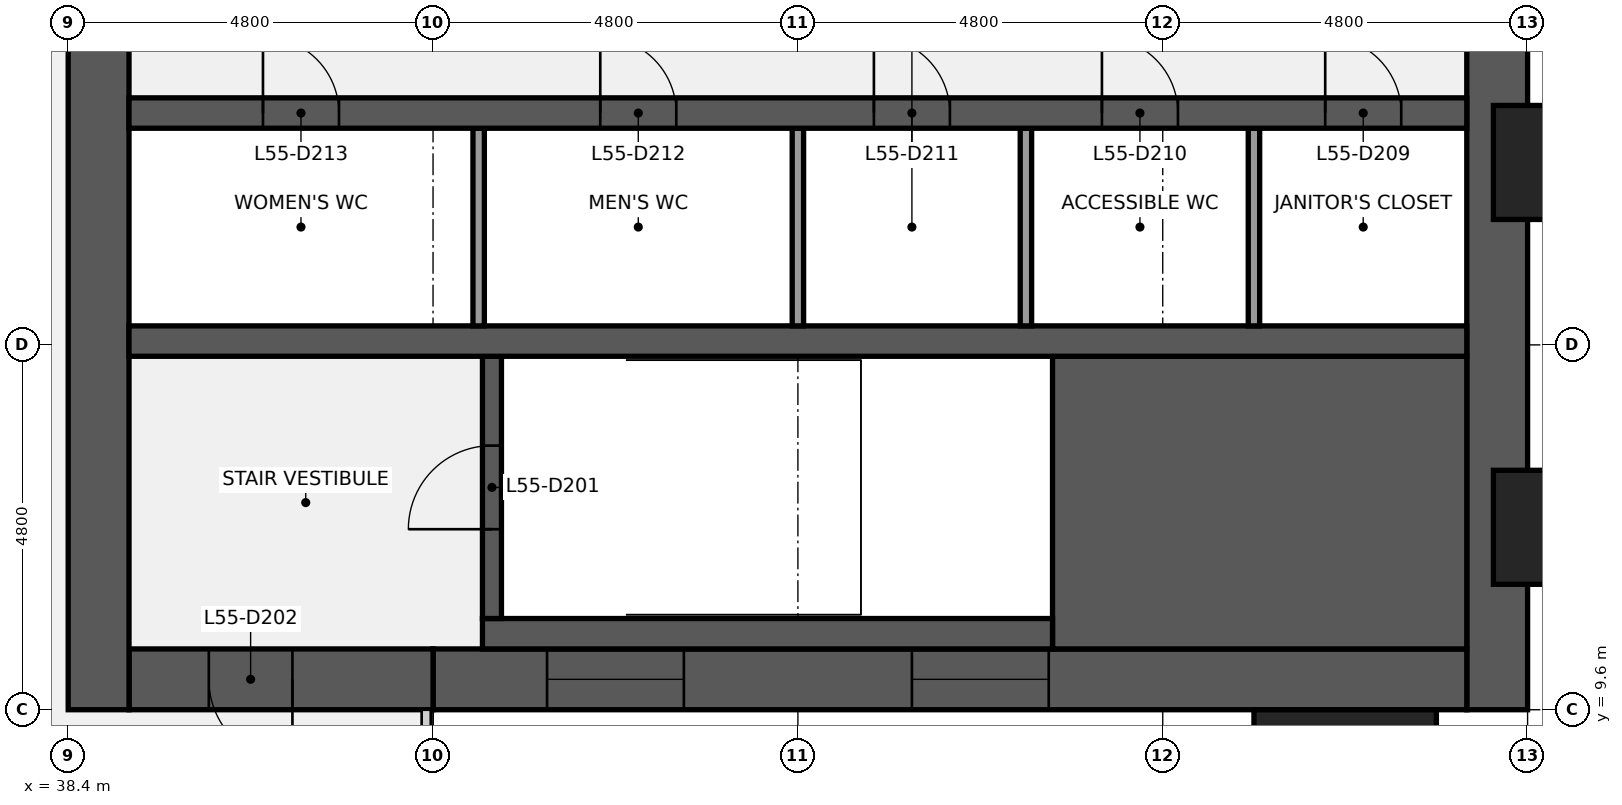
"""IFC4 building model, lengths in metres.
Left out: names, types, materials, properties, quantities, classifications, styles, units other than length and angle.
Written with IfcOpenShell. Run it as: python <this file> out.ifc"""

import sys

from ifc_helpers import new_model, si_unit, direction, frame, frame_2d, origin, origin_2d, place, context, subcontext, project, spatial, rectangle, extrude, element, fill, save


model = new_model("IFC4")
c1 = context("Model", 3, precision=1e-05, world=origin(), true_north=direction((0.0, 1.0)))
c2 = subcontext(c1, "Body", "Model", "MODEL_VIEW")
j1 = project(units=[si_unit("LENGTHUNIT", "METRE"), si_unit("PLANEANGLEUNIT", "RADIAN")], contexts=[c1])
p1 = place(None, origin())
s1 = spatial("IfcSite", under=j1, at=p1, CompositionType="ELEMENT")
p2 = place(p1, origin())
s2 = spatial("IfcBuilding", under=s1, at=p2, CompositionType="ELEMENT")
p3 = place(p2, frame((0.0, 0.0, 249.2)))
s3 = spatial("IfcBuildingStorey", under=s2, at=p3, CompositionType="ELEMENT", Elevation=249.2)
p4 = place(p3, frame((57.2, 38.4, 0.0), z_axis=(0.0, 0.0, 1.0), x_axis=(0.0, -1.0, 0.0)))
e1 = element("IfcWall", 1, at=p4, inside=s3, PredefinedType="SHEAR", context=c2, shape_type="SweptSolid", body=[
    extrude(rectangle(XDim=28.8, YDim=0.8, at=frame_2d((14.4, 0.0))), origin(), (0.0, 0.0, 1.0), 3.84),
])
p5 = place(p4, frame((18.45, 0.0, 0.9)))
e2 = element("IfcOpeningElement", 2, at=p5, cuts=e1, PredefinedType="OPENING", context=c2, shape_type="SweptSolid", body=[
    extrude(rectangle(XDim=1.5, YDim=1.5, at=frame_2d((0.75, 0.75))), frame((0.0, 0.41, 0.0), z_axis=(0.0, -1.0, 0.0), x_axis=(1.0, 0.0, 0.0)), (0.0, 0.0, 1.0), 0.82),
])
p6 = place(p4, frame((8.85, 0.0, 0.9)))
e3 = element("IfcOpeningElement", 3, at=p6, cuts=e1, PredefinedType="OPENING", context=c2, shape_type="SweptSolid", body=[
    extrude(rectangle(XDim=1.5, YDim=1.5, at=frame_2d((0.75, 0.75))), frame((0.0, 0.41, 0.0), z_axis=(0.0, -1.0, 0.0), x_axis=(1.0, 0.0, 0.0)), (0.0, 0.0, 1.0), 0.82),
])
p7 = place(p3, frame((56.8, 10.0, 0.0), z_axis=(0.0, 0.0, 1.0), x_axis=(-1.0, 0.0, 0.0)))
e4 = element("IfcWall", 4, at=p7, inside=s3, PredefinedType="SHEAR", context=c2, shape_type="SweptSolid", body=[
    extrude(rectangle(XDim=13.6, YDim=0.8, at=frame_2d((6.8, 0.0))), origin(), (0.0, 0.0, 1.0), 3.84),
])
p8 = place(p7, frame((5.5, 0.0, 0.9)))
e5 = element("IfcOpeningElement", 5, at=p8, cuts=e4, PredefinedType="OPENING", context=c2, shape_type="SweptSolid", body=[
    extrude(rectangle(XDim=1.8, YDim=1.5, at=frame_2d((0.9, 0.75))), frame((0.0, 0.41, 0.0), z_axis=(0.0, -1.0, 0.0), x_axis=(1.0, 0.0, 0.0)), (0.0, 0.0, 1.0), 0.82),
])
p9 = place(p7, frame((10.3, 0.0, 0.9)))
e6 = element("IfcOpeningElement", 6, at=p9, cuts=e4, PredefinedType="OPENING", context=c2, shape_type="SweptSolid", body=[
    extrude(rectangle(XDim=1.8, YDim=1.5, at=frame_2d((0.9, 0.75))), frame((0.0, 0.41, 0.0), z_axis=(0.0, -1.0, 0.0), x_axis=(1.0, 0.0, 0.0)), (0.0, 0.0, 1.0), 0.82),
])
p10 = place(p3, frame((43.2, 10.0, 0.0), z_axis=(0.0, 0.0, 1.0), x_axis=(-1.0, 0.0, 0.0)))
e7 = element("IfcWall", 7, at=p10, inside=s3, PredefinedType="SHEAR", context=c2, shape_type="SweptSolid", body=[
    extrude(rectangle(XDim=4.0, YDim=0.8, at=frame_2d((2.0, 0.0))), origin(), (0.0, 0.0, 1.0), 3.84),
])
p11 = place(p10, frame((1.85, 0.0, 0.0)))
e8 = element("IfcOpeningElement", 8, at=p11, cuts=e7, PredefinedType="OPENING", context=c2, shape_type="SweptSolid", body=[
    extrude(rectangle(XDim=1.1, YDim=2.1, at=frame_2d((0.55, 1.05))), frame((0.0, 0.41, 0.0), z_axis=(0.0, -1.0, 0.0), x_axis=(1.0, 0.0, 0.0)), (0.0, 0.0, 1.0), 0.82),
])
p12 = place(p3, frame((38.8, 9.6, 0.0), z_axis=(0.0, 0.0, 1.0), x_axis=(0.0, 1.0, 0.0)))
e9 = element("IfcWall", 9, at=p12, inside=s3, PredefinedType="SHEAR", context=c2, shape_type="SweptSolid", body=[
    extrude(rectangle(XDim=28.8, YDim=0.8, at=frame_2d((14.4, 0.0))), origin(), (0.0, 0.0, 1.0), 3.84),
])
p13 = place(p12, frame((8.7, 0.0, 0.0)))
e10 = element("IfcOpeningElement", 10, at=p13, cuts=e9, PredefinedType="OPENING", context=c2, shape_type="SweptSolid", body=[
    extrude(rectangle(XDim=1.8, YDim=2.1, at=frame_2d((0.9, 1.05))), frame((0.0, 0.41, 0.0), z_axis=(0.0, -1.0, 0.0), x_axis=(1.0, 0.0, 0.0)), (0.0, 0.0, 1.0), 0.82),
])
p14 = place(p12, frame((18.3, 0.0, 0.0)))
e11 = element("IfcOpeningElement", 11, at=p14, cuts=e9, PredefinedType="OPENING", context=c2, shape_type="SweptSolid", body=[
    extrude(rectangle(XDim=1.8, YDim=2.1, at=frame_2d((0.9, 1.05))), frame((0.0, 0.41, 0.0), z_axis=(0.0, -1.0, 0.0), x_axis=(1.0, 0.0, 0.0)), (0.0, 0.0, 1.0), 0.82),
])
p15 = place(p3, frame((51.35, 12.325, 0.0), z_axis=(0.0, 0.0, 1.0), x_axis=(1.0, 0.0, 0.0)))
e12 = element("IfcWall", 12, at=p15, inside=s3, PredefinedType="SHEAR", context=c2, shape_type="SweptSolid", body=[
    extrude(rectangle(XDim=5.45, YDim=3.85, at=frame_2d((2.725, 0.0))), origin(), (0.0, 0.0, 1.0), 3.84),
])
p16 = place(p3, frame((43.85, 10.6, 0.0), z_axis=(0.0, 0.0, 1.0), x_axis=(1.0, 0.0, 0.0)))
e13 = element("IfcWall", 13, at=p16, inside=s3, PredefinedType="SHEAR", context=c2, shape_type="SweptSolid", body=[
    extrude(rectangle(XDim=7.5, YDim=0.4, at=frame_2d((3.75, 0.0))), origin(), (0.0, 0.0, 1.0), 3.84),
])
p17 = place(p3, frame((43.975, 10.8, 0.0), z_axis=(0.0, 0.0, 1.0), x_axis=(0.0, 1.0, 0.0)))
e14 = element("IfcWall", 14, at=p17, inside=s3, PredefinedType="SHEAR", context=c2, shape_type="SweptSolid", body=[
    extrude(rectangle(XDim=3.45, YDim=0.25, at=frame_2d((1.725, 0.0))), origin(), (0.0, 0.0, 1.0), 3.84),
])
p18 = place(p17, frame((1.175, 0.0, 0.0)))
e15 = element("IfcOpeningElement", 15, at=p18, cuts=e14, PredefinedType="OPENING", context=c2, shape_type="SweptSolid", body=[
    extrude(rectangle(XDim=1.1, YDim=2.1, at=frame_2d((0.55, 1.05))), frame((0.0, 0.135, 0.0), z_axis=(0.0, -1.0, 0.0), x_axis=(1.0, 0.0, 0.0)), (0.0, 0.0, 1.0), 0.27),
])
p19 = place(p3, frame((39.2, 14.45, 0.0), z_axis=(0.0, 0.0, 1.0), x_axis=(1.0, 0.0, 0.0)))
e16 = element("IfcWall", 16, at=p19, inside=s3, PredefinedType="SHEAR", context=c2, shape_type="SweptSolid", body=[
    extrude(rectangle(XDim=17.6, YDim=0.4, at=frame_2d((8.8, 0.0))), origin(), (0.0, 0.0, 1.0), 3.84),
])
for number, where, z_axis, x_axis in (
    (17, (54.0, 14.65, 0.0), (0.0, 0.0, 1.0), (0.0, 1.0, 0.0)),
    (18, (51.0, 14.65, 0.0), (0.0, 0.0, 1.0), (0.0, 1.0, 0.0)),
    (19, (48.0, 14.65, 0.0), (0.0, 0.0, 1.0), (0.0, 1.0, 0.0)),
    (20, (43.8, 14.65, 0.0), (0.0, 0.0, 1.0), (0.0, 1.0, 0.0)),
):
    element("IfcWall", number, at=place(p3, frame(where, z_axis=z_axis, x_axis=x_axis)), inside=s3, PredefinedType="PARTITIONING", context=c2, shape_type="SweptSolid", body=[
        extrude(rectangle(XDim=2.6, YDim=0.15, at=frame_2d((1.3, 0.0))), origin(), (0.0, 0.0, 1.0), 3.84),
    ])
p20 = place(p3, frame((39.2, 17.45, 0.0), z_axis=(0.0, 0.0, 1.0), x_axis=(1.0, 0.0, 0.0)))
e21 = element("IfcWall", 21, at=p20, inside=s3, PredefinedType="SHEAR", context=c2, shape_type="SweptSolid", body=[
    extrude(rectangle(XDim=17.6, YDim=0.4, at=frame_2d((8.8, 0.0))), origin(), (0.0, 0.0, 1.0), 3.84),
])
p21 = place(p20, frame((15.738, 0.0, 0.0)))
e22 = element("IfcOpeningElement", 22, at=p21, cuts=e21, PredefinedType="OPENING", context=c2, shape_type="SweptSolid", body=[
    extrude(rectangle(XDim=1.0, YDim=2.1, at=frame_2d((0.5, 1.05))), frame((0.0, 0.21, 0.0), z_axis=(0.0, -1.0, 0.0), x_axis=(1.0, 0.0, 0.0)), (0.0, 0.0, 1.0), 0.42),
])
p22 = place(p20, frame((12.8, 0.0, 0.0)))
e23 = element("IfcOpeningElement", 23, at=p22, cuts=e21, PredefinedType="OPENING", context=c2, shape_type="SweptSolid", body=[
    extrude(rectangle(XDim=1.0, YDim=2.1, at=frame_2d((0.5, 1.05))), frame((0.0, 0.21, 0.0), z_axis=(0.0, -1.0, 0.0), x_axis=(1.0, 0.0, 0.0)), (0.0, 0.0, 1.0), 0.42),
])
p23 = place(p20, frame((9.8, 0.0, 0.0)))
e24 = element("IfcOpeningElement", 24, at=p23, cuts=e21, PredefinedType="OPENING", context=c2, shape_type="SweptSolid", body=[
    extrude(rectangle(XDim=1.0, YDim=2.1, at=frame_2d((0.5, 1.05))), frame((0.0, 0.21, 0.0), z_axis=(0.0, -1.0, 0.0), x_axis=(1.0, 0.0, 0.0)), (0.0, 0.0, 1.0), 0.42),
])
p24 = place(p20, frame((6.2, 0.0, 0.0)))
e25 = element("IfcOpeningElement", 25, at=p24, cuts=e21, PredefinedType="OPENING", context=c2, shape_type="SweptSolid", body=[
    extrude(rectangle(XDim=1.0, YDim=2.1, at=frame_2d((0.5, 1.05))), frame((0.0, 0.21, 0.0), z_axis=(0.0, -1.0, 0.0), x_axis=(1.0, 0.0, 0.0)), (0.0, 0.0, 1.0), 0.42),
])
p25 = place(p20, frame((1.762, 0.0, 0.0)))
e26 = element("IfcOpeningElement", 26, at=p25, cuts=e21, PredefinedType="OPENING", context=c2, shape_type="SweptSolid", body=[
    extrude(rectangle(XDim=1.0, YDim=2.1, at=frame_2d((0.5, 1.05))), frame((0.0, 0.21, 0.0), z_axis=(0.0, -1.0, 0.0), x_axis=(1.0, 0.0, 0.0)), (0.0, 0.0, 1.0), 0.42),
])
for number, where, z_axis, x_axis in (
    (27, (55.2, 8.85, 0.0), (0.0, 0.0, 1.0), (1.0, 0.0, 0.0)),
    (28, (58.35, 12.0, 0.0), (0.0, 0.0, 1.0), (0.0, 1.0, 0.0)),
    (29, (58.35, 16.8, 0.0), (0.0, 0.0, 1.0), (0.0, 1.0, 0.0)),
):
    element("IfcColumn", number, at=place(p3, frame(where, z_axis=z_axis, x_axis=x_axis)), inside=s3, PredefinedType="PILASTER", context=c2, shape_type="SweptSolid", body=[
        extrude(rectangle(XDim=2.4, YDim=1.5, at=origin_2d()), origin(), (0.0, 0.0, 1.0), 4.0),
    ])
p26 = place(p18, origin())
e30 = element("IfcDoor", 30, at=p26, inside=s3, OperationType="SINGLE_SWING_LEFT", PredefinedType="DOOR", context=c2, shape_type="SweptSolid", body=[
    extrude(rectangle(XDim=1.1, YDim=2.1, at=frame_2d((0.55, 1.05))), frame((0.0, 0.025, 0.0), z_axis=(0.0, -1.0, 0.0), x_axis=(1.0, 0.0, 0.0)), (0.0, 0.0, 1.0), 0.05),
])
fill(e15, e30)
p27 = place(p11, origin())
e31 = element("IfcDoor", 31, at=p27, inside=s3, OperationType="SINGLE_SWING_LEFT", PredefinedType="DOOR", context=c2, shape_type="SweptSolid", body=[
    extrude(rectangle(XDim=1.1, YDim=2.1, at=frame_2d((0.55, 1.05))), frame((0.0, 0.025, 0.0), z_axis=(0.0, -1.0, 0.0), x_axis=(1.0, 0.0, 0.0)), (0.0, 0.0, 1.0), 0.05),
])
fill(e8, e31)
p28 = place(p21, origin())
e32 = element("IfcDoor", 32, at=p28, inside=s3, OperationType="SINGLE_SWING_LEFT", PredefinedType="DOOR", context=c2, shape_type="SweptSolid", body=[
    extrude(rectangle(XDim=1.0, YDim=2.1, at=frame_2d((0.5, 1.05))), frame((0.0, 0.025, 0.0), z_axis=(0.0, -1.0, 0.0), x_axis=(1.0, 0.0, 0.0)), (0.0, 0.0, 1.0), 0.05),
])
fill(e22, e32)
p29 = place(p22, origin())
e33 = element("IfcDoor", 33, at=p29, inside=s3, OperationType="SINGLE_SWING_LEFT", PredefinedType="DOOR", context=c2, shape_type="SweptSolid", body=[
    extrude(rectangle(XDim=1.0, YDim=2.1, at=frame_2d((0.5, 1.05))), frame((0.0, 0.025, 0.0), z_axis=(0.0, -1.0, 0.0), x_axis=(1.0, 0.0, 0.0)), (0.0, 0.0, 1.0), 0.05),
])
fill(e23, e33)
p30 = place(p23, origin())
e34 = element("IfcDoor", 34, at=p30, inside=s3, OperationType="SINGLE_SWING_LEFT", PredefinedType="DOOR", context=c2, shape_type="SweptSolid", body=[
    extrude(rectangle(XDim=1.0, YDim=2.1, at=frame_2d((0.5, 1.05))), frame((0.0, 0.025, 0.0), z_axis=(0.0, -1.0, 0.0), x_axis=(1.0, 0.0, 0.0)), (0.0, 0.0, 1.0), 0.05),
])
fill(e24, e34)
p31 = place(p24, origin())
e35 = element("IfcDoor", 35, at=p31, inside=s3, OperationType="SINGLE_SWING_LEFT", PredefinedType="DOOR", context=c2, shape_type="SweptSolid", body=[
    extrude(rectangle(XDim=1.0, YDim=2.1, at=frame_2d((0.5, 1.05))), frame((0.0, 0.025, 0.0), z_axis=(0.0, -1.0, 0.0), x_axis=(1.0, 0.0, 0.0)), (0.0, 0.0, 1.0), 0.05),
])
fill(e25, e35)
p32 = place(p25, origin())
e36 = element("IfcDoor", 36, at=p32, inside=s3, OperationType="SINGLE_SWING_LEFT", PredefinedType="DOOR", context=c2, shape_type="SweptSolid", body=[
    extrude(rectangle(XDim=1.0, YDim=2.1, at=frame_2d((0.5, 1.05))), frame((0.0, 0.025, 0.0), z_axis=(0.0, -1.0, 0.0), x_axis=(1.0, 0.0, 0.0)), (0.0, 0.0, 1.0), 0.05),
])
fill(e26, e36)
p33 = place(p8, origin())
e37 = element("IfcWindow", 37, at=p33, inside=s3, PartitioningType="SINGLE_PANEL", PredefinedType="WINDOW", context=c2, shape_type="SweptSolid", body=[
    extrude(rectangle(XDim=1.8, YDim=1.5, at=frame_2d((0.9, 0.75))), frame((0.0, 0.03, 0.0), z_axis=(0.0, -1.0, 0.0), x_axis=(1.0, 0.0, 0.0)), (0.0, 0.0, 1.0), 0.06),
])
fill(e5, e37)
p34 = place(p9, origin())
e38 = element("IfcWindow", 38, at=p34, inside=s3, PartitioningType="SINGLE_PANEL", PredefinedType="WINDOW", context=c2, shape_type="SweptSolid", body=[
    extrude(rectangle(XDim=1.8, YDim=1.5, at=frame_2d((0.9, 0.75))), frame((0.0, 0.03, 0.0), z_axis=(0.0, -1.0, 0.0), x_axis=(1.0, 0.0, 0.0)), (0.0, 0.0, 1.0), 0.06),
])
fill(e6, e38)
save(model, sys.argv[1])
